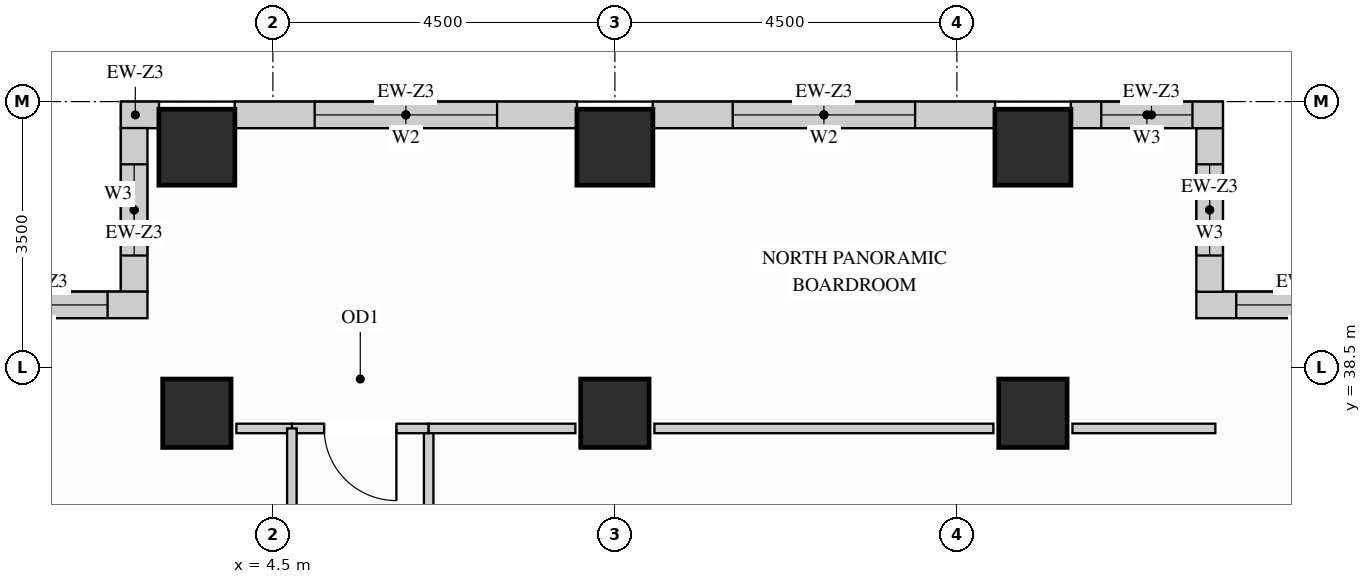
"""IFC4 building model, lengths in metres.
Left out: names, types, materials, properties, quantities, classifications, styles, units other than length and angle.
Written with IfcOpenShell. Run it as: python <this file> out.ifc"""

import sys

from ifc_helpers import new_model, si_unit, direction, frame, frame_2d, origin, origin_2d, place, context, subcontext, project, spatial, rectangle, extrude, source, transform, mapped, element, fill, save


model = new_model("IFC4")
c1 = context("Model", 3, precision=1e-05, world=origin(), true_north=direction((0.0, 1.0)))
c2 = subcontext(c1, "Body", "Model", "MODEL_VIEW")
j1 = project(units=[si_unit("LENGTHUNIT", "METRE"), si_unit("PLANEANGLEUNIT", "RADIAN")], contexts=[c1])
p1 = place(None, origin())
s1 = spatial("IfcSite", under=j1, at=p1, CompositionType="ELEMENT")
p2 = place(p1, origin())
s2 = spatial("IfcBuilding", under=s1, at=p2, CompositionType="ELEMENT")
p3 = place(p2, frame((0.0, 0.0, 193.5)))
s3 = spatial("IfcBuildingStorey", under=s2, at=p3, CompositionType="ELEMENT", Elevation=193.5)
m1 = source(origin(), c2, "Body", "SweptSolid", [
    extrude(rectangle(XDim=0.9, YDim=0.9, at=origin_2d()), origin(), (0.0, 0.0, 1.0), 3.4),
])
for number, where, z_axis, x_axis in (
    (1, (14.5, 37.9, 0.0), (0.0, 0.0, 1.0), (1.0, 0.0, 0.0)),
    (2, (3.5, 37.9, 0.0), (0.0, 0.0, 1.0), (1.0, 0.0, 0.0)),
    (3, (9.0, 37.9, 0.0), (0.0, 0.0, 1.0), (1.0, 0.0, 0.0)),
):
    element("IfcColumn", number, at=place(p3, frame(where, z_axis=z_axis, x_axis=x_axis)), inside=s3, PredefinedType="COLUMN", context=c2, shape_type="MappedRepresentation", body=[
        mapped(m1, transform((0.0, 0.0, 0.0), x_axis=(1.0, 0.0, 0.0), y_axis=(0.0, 1.0, 0.0), z_axis=(0.0, 0.0, 1.0))),
    ])
m2 = source(origin(), c2, "Body", "SweptSolid", [
    extrude(rectangle(XDim=1.0, YDim=1.0, at=origin_2d()), origin(), (0.0, 0.0, 1.0), 3.4),
])
for number, where, z_axis, x_axis in (
    (4, (14.5, 41.4, 0.0), (0.0, 0.0, 1.0), (1.0, 0.0, 0.0)),
    (5, (3.5, 41.4, 0.0), (0.0, 0.0, 1.0), (1.0, 0.0, 0.0)),
    (6, (9.0, 41.4, 0.0), (0.0, 0.0, 1.0), (1.0, 0.0, 0.0)),
):
    element("IfcColumn", number, at=place(p3, frame(where, z_axis=z_axis, x_axis=x_axis)), inside=s3, PredefinedType="COLUMN", context=c2, shape_type="MappedRepresentation", body=[
        mapped(m2, transform((0.0, 0.0, 0.0), x_axis=(1.0, 0.0, 0.0), y_axis=(0.0, 1.0, 0.0), z_axis=(0.0, 0.0, 1.0))),
    ])
p4 = place(p3, frame((19.5, 39.325, 0.0), z_axis=(0.0, 0.0, 1.0), x_axis=(-1.0, 0.0, 0.0)))
e7 = element("IfcWall", 7, at=p4, inside=s3, PredefinedType="SOLIDWALL", context=c2, shape_type="SweptSolid", body=[
    extrude(rectangle(XDim=2.85, YDim=0.35, at=frame_2d((1.425, 0.0))), origin(), (0.0, 0.0, 1.0), 3.385),
])
p5 = place(p4, frame((0.525, 0.0, 0.78)))
e8 = element("IfcOpeningElement", 8, at=p5, cuts=e7, PredefinedType="OPENING", context=c2, shape_type="SweptSolid", body=[
    extrude(rectangle(XDim=1.8, YDim=2.1, at=frame_2d((0.9, 1.05))), frame((0.0, 0.185, 0.0), z_axis=(0.0, -1.0, 0.0), x_axis=(1.0, 0.0, 0.0)), (0.0, 0.0, 1.0), 0.37),
])
p6 = place(p3, frame((16.825, 39.498, 0.0), z_axis=(0.0, 0.0, 1.0), x_axis=(0.0, 1.0, 0.0)))
e9 = element("IfcWall", 9, at=p6, inside=s3, PredefinedType="SOLIDWALL", context=c2, shape_type="SweptSolid", body=[
    extrude(rectangle(XDim=2.154, YDim=0.35, at=frame_2d((1.077, 0.0))), origin(), (0.0, 0.0, 1.0), 3.385),
])
p7 = place(p6, frame((0.477, 0.0, 0.78)))
e10 = element("IfcOpeningElement", 10, at=p7, cuts=e9, PredefinedType="OPENING", context=c2, shape_type="SweptSolid", body=[
    extrude(rectangle(XDim=1.2, YDim=2.1, at=frame_2d((0.6, 1.05))), frame((0.0, 0.185, 0.0), z_axis=(0.0, -1.0, 0.0), x_axis=(1.0, 0.0, 0.0)), (0.0, 0.0, 1.0), 0.37),
])
p8 = place(p3, frame((17.0, 41.825, 0.0), z_axis=(0.0, 0.0, 1.0), x_axis=(-1.0, 0.0, 0.0)))
e11 = element("IfcWall", 11, at=p8, inside=s3, PredefinedType="SOLIDWALL", context=c2, shape_type="SweptSolid", body=[
    extrude(rectangle(XDim=2.002, YDim=0.35, at=frame_2d((1.001, 0.0))), origin(), (0.0, 0.0, 1.0), 3.385),
])
p9 = place(p8, frame((0.401, 0.0, 0.78)))
e12 = element("IfcOpeningElement", 12, at=p9, cuts=e11, PredefinedType="OPENING", context=c2, shape_type="SweptSolid", body=[
    extrude(rectangle(XDim=1.2, YDim=2.1, at=frame_2d((0.6, 1.05))), frame((0.0, 0.185, 0.0), z_axis=(0.0, -1.0, 0.0), x_axis=(1.0, 0.0, 0.0)), (0.0, 0.0, 1.0), 0.37),
])
p10 = place(p3, frame((14.002, 41.825, 0.0), z_axis=(0.0, 0.0, 1.0), x_axis=(-1.0, 0.0, 0.0)))
e13 = element("IfcWall", 13, at=p10, inside=s3, PredefinedType="SOLIDWALL", context=c2, shape_type="SweptSolid", body=[
    extrude(rectangle(XDim=4.504, YDim=0.35, at=frame_2d((2.252, 0.0))), origin(), (0.0, 0.0, 1.0), 2.612),
])
p11 = place(p10, frame((1.052, 0.0, 0.78)))
e14 = element("IfcOpeningElement", 14, at=p11, cuts=e13, PredefinedType="OPENING", context=c2, shape_type="SweptSolid", body=[
    extrude(rectangle(XDim=2.4, YDim=1.652, at=frame_2d((1.2, 0.826))), frame((0.0, 0.185, 0.0), z_axis=(0.0, -1.0, 0.0), x_axis=(1.0, 0.0, 0.0)), (0.0, 0.0, 1.0), 0.37),
])
p12 = place(p3, frame((8.502, 41.825, 0.0), z_axis=(0.0, 0.0, 1.0), x_axis=(-1.0, 0.0, 0.0)))
e15 = element("IfcWall", 15, at=p12, inside=s3, PredefinedType="SOLIDWALL", context=c2, shape_type="SweptSolid", body=[
    extrude(rectangle(XDim=4.504, YDim=0.35, at=frame_2d((2.252, 0.0))), origin(), (0.0, 0.0, 1.0), 2.612),
])
p13 = place(p12, frame((1.052, 0.0, 0.78)))
e16 = element("IfcOpeningElement", 16, at=p13, cuts=e15, PredefinedType="OPENING", context=c2, shape_type="SweptSolid", body=[
    extrude(rectangle(XDim=2.4, YDim=1.652, at=frame_2d((1.2, 0.826))), frame((0.0, 0.185, 0.0), z_axis=(0.0, -1.0, 0.0), x_axis=(1.0, 0.0, 0.0)), (0.0, 0.0, 1.0), 0.37),
])
m3 = source(origin(), c2, "Body", "SweptSolid", [
    extrude(rectangle(XDim=0.502, YDim=0.35, at=frame_2d((0.251, 0.0))), origin(), (0.0, 0.0, 1.0), 3.385),
])
p14 = place(p3, frame((3.002, 41.825, 0.0), z_axis=(0.0, 0.0, 1.0), x_axis=(-1.0, 0.0, 0.0)))
e17 = element("IfcWall", 17, at=p14, inside=s3, PredefinedType="SOLIDWALL", context=c2, shape_type="MappedRepresentation", body=[
    mapped(m3, transform((0.0, 0.0, 0.0), x_axis=(1.0, 0.0, 0.0), y_axis=(0.0, 1.0, 0.0), z_axis=(0.0, 0.0, 1.0))),
])
p15 = place(p3, frame((2.675, 41.652, 0.0), z_axis=(0.0, 0.0, 1.0), x_axis=(0.0, -1.0, 0.0)))
e18 = element("IfcWall", 18, at=p15, inside=s3, PredefinedType="SOLIDWALL", context=c2, shape_type="SweptSolid", body=[
    extrude(rectangle(XDim=2.154, YDim=0.35, at=frame_2d((1.077, 0.0))), origin(), (0.0, 0.0, 1.0), 3.385),
])
p16 = place(p15, frame((0.477, 0.0, 0.78)))
e19 = element("IfcOpeningElement", 19, at=p16, cuts=e18, PredefinedType="OPENING", context=c2, shape_type="SweptSolid", body=[
    extrude(rectangle(XDim=1.2, YDim=2.1, at=frame_2d((0.6, 1.05))), frame((0.0, 0.185, 0.0), z_axis=(0.0, -1.0, 0.0), x_axis=(1.0, 0.0, 0.0)), (0.0, 0.0, 1.0), 0.37),
])
p17 = place(p3, frame((2.85, 39.325, 0.0), z_axis=(0.0, 0.0, 1.0), x_axis=(-1.0, 0.0, 0.0)))
e20 = element("IfcWall", 20, at=p17, inside=s3, PredefinedType="SOLIDWALL", context=c2, shape_type="SweptSolid", body=[
    extrude(rectangle(XDim=2.85, YDim=0.35, at=frame_2d((1.425, 0.0))), origin(), (0.0, 0.0, 1.0), 3.385),
])
p18 = place(p17, frame((0.525, 0.0, 0.78)))
e21 = element("IfcOpeningElement", 21, at=p18, cuts=e20, PredefinedType="OPENING", context=c2, shape_type="SweptSolid", body=[
    extrude(rectangle(XDim=1.8, YDim=2.1, at=frame_2d((0.9, 1.05))), frame((0.0, 0.185, 0.0), z_axis=(0.0, -1.0, 0.0), x_axis=(1.0, 0.0, 0.0)), (0.0, 0.0, 1.0), 0.37),
])
p19 = place(p3, frame((6.55, 34.675, 0.0), z_axis=(0.0, 0.0, 1.0), x_axis=(0.0, 1.0, 0.0)))
e22 = element("IfcWall", 22, at=p19, inside=s3, PredefinedType="PARTITIONING", context=c2, shape_type="SweptSolid", body=[
    extrude(rectangle(XDim=3.025, YDim=0.125, at=frame_2d((1.512, 0.0))), origin(), (0.0, 0.0, 1.0), 3.385),
])
p20 = place(p19, frame((1.038, 0.0, 0.0)))
e23 = element("IfcOpeningElement", 23, at=p20, cuts=e22, PredefinedType="OPENING", context=c2, shape_type="SweptSolid", body=[
    extrude(rectangle(XDim=0.95, YDim=2.15, at=frame_2d((0.475, 1.075))), frame((0.0, 0.073, 0.0), z_axis=(0.0, -1.0, 0.0), x_axis=(1.0, 0.0, 0.0)), (0.0, 0.0, 1.0), 0.145),
])
p21 = place(p3, frame((4.75, 37.7, 0.0), z_axis=(0.0, 0.0, 1.0), x_axis=(1.0, 0.0, 0.0)))
e24 = element("IfcWall", 24, at=p21, inside=s3, PredefinedType="PARTITIONING", context=c2, shape_type="SweptSolid", body=[
    extrude(rectangle(XDim=1.8, YDim=0.125, at=frame_2d((0.9, 0.0))), origin(), (0.0, 0.0, 1.0), 2.773),
])
p22 = place(p21, frame((0.425, 0.0, 0.0)))
e25 = element("IfcOpeningElement", 25, at=p22, cuts=e24, PredefinedType="OPENING", context=c2, shape_type="SweptSolid", body=[
    extrude(rectangle(XDim=0.95, YDim=2.15, at=frame_2d((0.475, 1.075))), frame((0.0, 0.073, 0.0), z_axis=(0.0, -1.0, 0.0), x_axis=(1.0, 0.0, 0.0)), (0.0, 0.0, 1.0), 0.145),
])
m4 = source(origin(), c2, "Body", "SweptSolid", [
    extrude(rectangle(XDim=1.93, YDim=0.125, at=frame_2d((0.965, 0.0))), origin(), (0.0, 0.0, 1.0), 2.773),
])
p23 = place(p3, frame((6.55, 37.7, 0.0), z_axis=(0.0, 0.0, 1.0), x_axis=(1.0, 0.0, 0.0)))
e26 = element("IfcWall", 26, at=p23, inside=s3, PredefinedType="PARTITIONING", context=c2, shape_type="MappedRepresentation", body=[
    mapped(m4, transform((0.0, 0.0, 0.0), x_axis=(1.0, 0.0, 0.0), y_axis=(0.0, 1.0, 0.0), z_axis=(0.0, 0.0, 1.0))),
])
m5 = source(origin(), c2, "Body", "SweptSolid", [
    extrude(rectangle(XDim=4.46, YDim=0.125, at=frame_2d((2.23, 0.0))), origin(), (0.0, 0.0, 1.0), 2.773),
])
p24 = place(p3, frame((9.52, 37.7, 0.0), z_axis=(0.0, 0.0, 1.0), x_axis=(1.0, 0.0, 0.0)))
e27 = element("IfcWall", 27, at=p24, inside=s3, PredefinedType="PARTITIONING", context=c2, shape_type="MappedRepresentation", body=[
    mapped(m5, transform((0.0, 0.0, 0.0), x_axis=(1.0, 0.0, 0.0), y_axis=(0.0, 1.0, 0.0), z_axis=(0.0, 0.0, 1.0))),
])
m6 = source(origin(), c2, "Body", "SweptSolid", [
    extrude(rectangle(XDim=1.88, YDim=0.125, at=frame_2d((0.94, 0.0))), origin(), (0.0, 0.0, 1.0), 2.773),
])
p25 = place(p3, frame((15.02, 37.7, 0.0), z_axis=(0.0, 0.0, 1.0), x_axis=(1.0, 0.0, 0.0)))
e28 = element("IfcWall", 28, at=p25, inside=s3, PredefinedType="PARTITIONING", context=c2, shape_type="MappedRepresentation", body=[
    mapped(m6, transform((0.0, 0.0, 0.0), x_axis=(1.0, 0.0, 0.0), y_axis=(0.0, 1.0, 0.0), z_axis=(0.0, 0.0, 1.0))),
])
m7 = source(origin(), c2, "Body", "SweptSolid", [
    extrude(rectangle(XDim=0.73, YDim=0.125, at=frame_2d((0.365, 0.0))), origin(), (0.0, 0.0, 1.0), 2.773),
])
p26 = place(p3, frame((4.02, 37.7, 0.0), z_axis=(0.0, 0.0, 1.0), x_axis=(1.0, 0.0, 0.0)))
e29 = element("IfcWall", 29, at=p26, inside=s3, PredefinedType="PARTITIONING", context=c2, shape_type="MappedRepresentation", body=[
    mapped(m7, transform((0.0, 0.0, 0.0), x_axis=(1.0, 0.0, 0.0), y_axis=(0.0, 1.0, 0.0), z_axis=(0.0, 0.0, 1.0))),
])
p27 = place(p3, frame((4.75, 34.675, 0.0), z_axis=(0.0, 0.0, 1.0), x_axis=(0.0, 1.0, 0.0)))
e30 = element("IfcWall", 30, at=p27, inside=s3, PredefinedType="PARTITIONING", context=c2, shape_type="SweptSolid", body=[
    extrude(rectangle(XDim=3.025, YDim=0.125, at=frame_2d((1.512, 0.0))), origin(), (0.0, 0.0, 1.0), 3.385),
])
p28 = place(p27, frame((1.038, 0.0, 0.0)))
e31 = element("IfcOpeningElement", 31, at=p28, cuts=e30, PredefinedType="OPENING", context=c2, shape_type="SweptSolid", body=[
    extrude(rectangle(XDim=0.95, YDim=2.15, at=frame_2d((0.475, 1.075))), frame((0.0, 0.073, 0.0), z_axis=(0.0, -1.0, 0.0), x_axis=(1.0, 0.0, 0.0)), (0.0, 0.0, 1.0), 0.145),
])
m8 = source(origin(), c2, "Body", "SweptSolid", [
    extrude(rectangle(XDim=0.95, YDim=2.15, at=frame_2d((0.475, 1.075))), frame((0.0, 0.025, 0.0), z_axis=(0.0, -1.0, 0.0), x_axis=(1.0, 0.0, 0.0)), (0.0, 0.0, 1.0), 0.05),
])
p29 = place(p22, origin())
e32 = element("IfcDoor", 32, at=p29, inside=s3, OperationType="SINGLE_SWING_RIGHT", PredefinedType="DOOR", context=c2, shape_type="MappedRepresentation", body=[
    mapped(m8, transform((0.0, 0.0, 0.0), x_axis=(1.0, 0.0, 0.0), y_axis=(0.0, 1.0, 0.0), z_axis=(0.0, 0.0, 1.0))),
])
fill(e25, e32)
m9 = source(origin(), c2, "Body", "SweptSolid", [
    extrude(rectangle(XDim=1.8, YDim=2.1, at=frame_2d((0.9, 1.05))), frame((0.0, 0.03, 0.0), z_axis=(0.0, -1.0, 0.0), x_axis=(1.0, 0.0, 0.0)), (0.0, 0.0, 1.0), 0.06),
])
p30 = place(p5, origin())
e33 = element("IfcWindow", 33, at=p30, inside=s3, PartitioningType="SINGLE_PANEL", PredefinedType="WINDOW", context=c2, shape_type="MappedRepresentation", body=[
    mapped(m9, transform((0.0, 0.0, 0.0), x_axis=(1.0, 0.0, 0.0), y_axis=(0.0, 1.0, 0.0), z_axis=(0.0, 0.0, 1.0))),
])
fill(e8, e33)
p31 = place(p18, origin())
e34 = element("IfcWindow", 34, at=p31, inside=s3, PartitioningType="SINGLE_PANEL", PredefinedType="WINDOW", context=c2, shape_type="MappedRepresentation", body=[
    mapped(m9, transform((0.0, 0.0, 0.0), x_axis=(1.0, 0.0, 0.0), y_axis=(0.0, 1.0, 0.0), z_axis=(0.0, 0.0, 1.0))),
])
fill(e21, e34)
m10 = source(origin(), c2, "Body", "SweptSolid", [
    extrude(rectangle(XDim=2.4, YDim=1.652, at=frame_2d((1.2, 0.826))), frame((0.0, 0.03, 0.0), z_axis=(0.0, -1.0, 0.0), x_axis=(1.0, 0.0, 0.0)), (0.0, 0.0, 1.0), 0.06),
])
p32 = place(p11, origin())
e35 = element("IfcWindow", 35, at=p32, inside=s3, PartitioningType="SINGLE_PANEL", PredefinedType="WINDOW", context=c2, shape_type="MappedRepresentation", body=[
    mapped(m10, transform((0.0, 0.0, 0.0), x_axis=(1.0, 0.0, 0.0), y_axis=(0.0, 1.0, 0.0), z_axis=(0.0, 0.0, 1.0))),
])
fill(e14, e35)
p33 = place(p13, origin())
e36 = element("IfcWindow", 36, at=p33, inside=s3, PartitioningType="SINGLE_PANEL", PredefinedType="WINDOW", context=c2, shape_type="MappedRepresentation", body=[
    mapped(m10, transform((0.0, 0.0, 0.0), x_axis=(1.0, 0.0, 0.0), y_axis=(0.0, 1.0, 0.0), z_axis=(0.0, 0.0, 1.0))),
])
fill(e16, e36)
m11 = source(origin(), c2, "Body", "SweptSolid", [
    extrude(rectangle(XDim=1.2, YDim=2.1, at=frame_2d((0.6, 1.05))), frame((0.0, 0.03, 0.0), z_axis=(0.0, -1.0, 0.0), x_axis=(1.0, 0.0, 0.0)), (0.0, 0.0, 1.0), 0.06),
])
p34 = place(p7, origin())
e37 = element("IfcWindow", 37, at=p34, inside=s3, PartitioningType="SINGLE_PANEL", PredefinedType="WINDOW", context=c2, shape_type="MappedRepresentation", body=[
    mapped(m11, transform((0.0, 0.0, 0.0), x_axis=(1.0, 0.0, 0.0), y_axis=(0.0, 1.0, 0.0), z_axis=(0.0, 0.0, 1.0))),
])
fill(e10, e37)
p35 = place(p9, origin())
e38 = element("IfcWindow", 38, at=p35, inside=s3, PartitioningType="SINGLE_PANEL", PredefinedType="WINDOW", context=c2, shape_type="MappedRepresentation", body=[
    mapped(m11, transform((0.0, 0.0, 0.0), x_axis=(1.0, 0.0, 0.0), y_axis=(0.0, 1.0, 0.0), z_axis=(0.0, 0.0, 1.0))),
])
fill(e12, e38)
p36 = place(p16, origin())
e39 = element("IfcWindow", 39, at=p36, inside=s3, PartitioningType="SINGLE_PANEL", PredefinedType="WINDOW", context=c2, shape_type="MappedRepresentation", body=[
    mapped(m11, transform((0.0, 0.0, 0.0), x_axis=(1.0, 0.0, 0.0), y_axis=(0.0, 1.0, 0.0), z_axis=(0.0, 0.0, 1.0))),
])
fill(e19, e39)
save(model, sys.argv[1])
